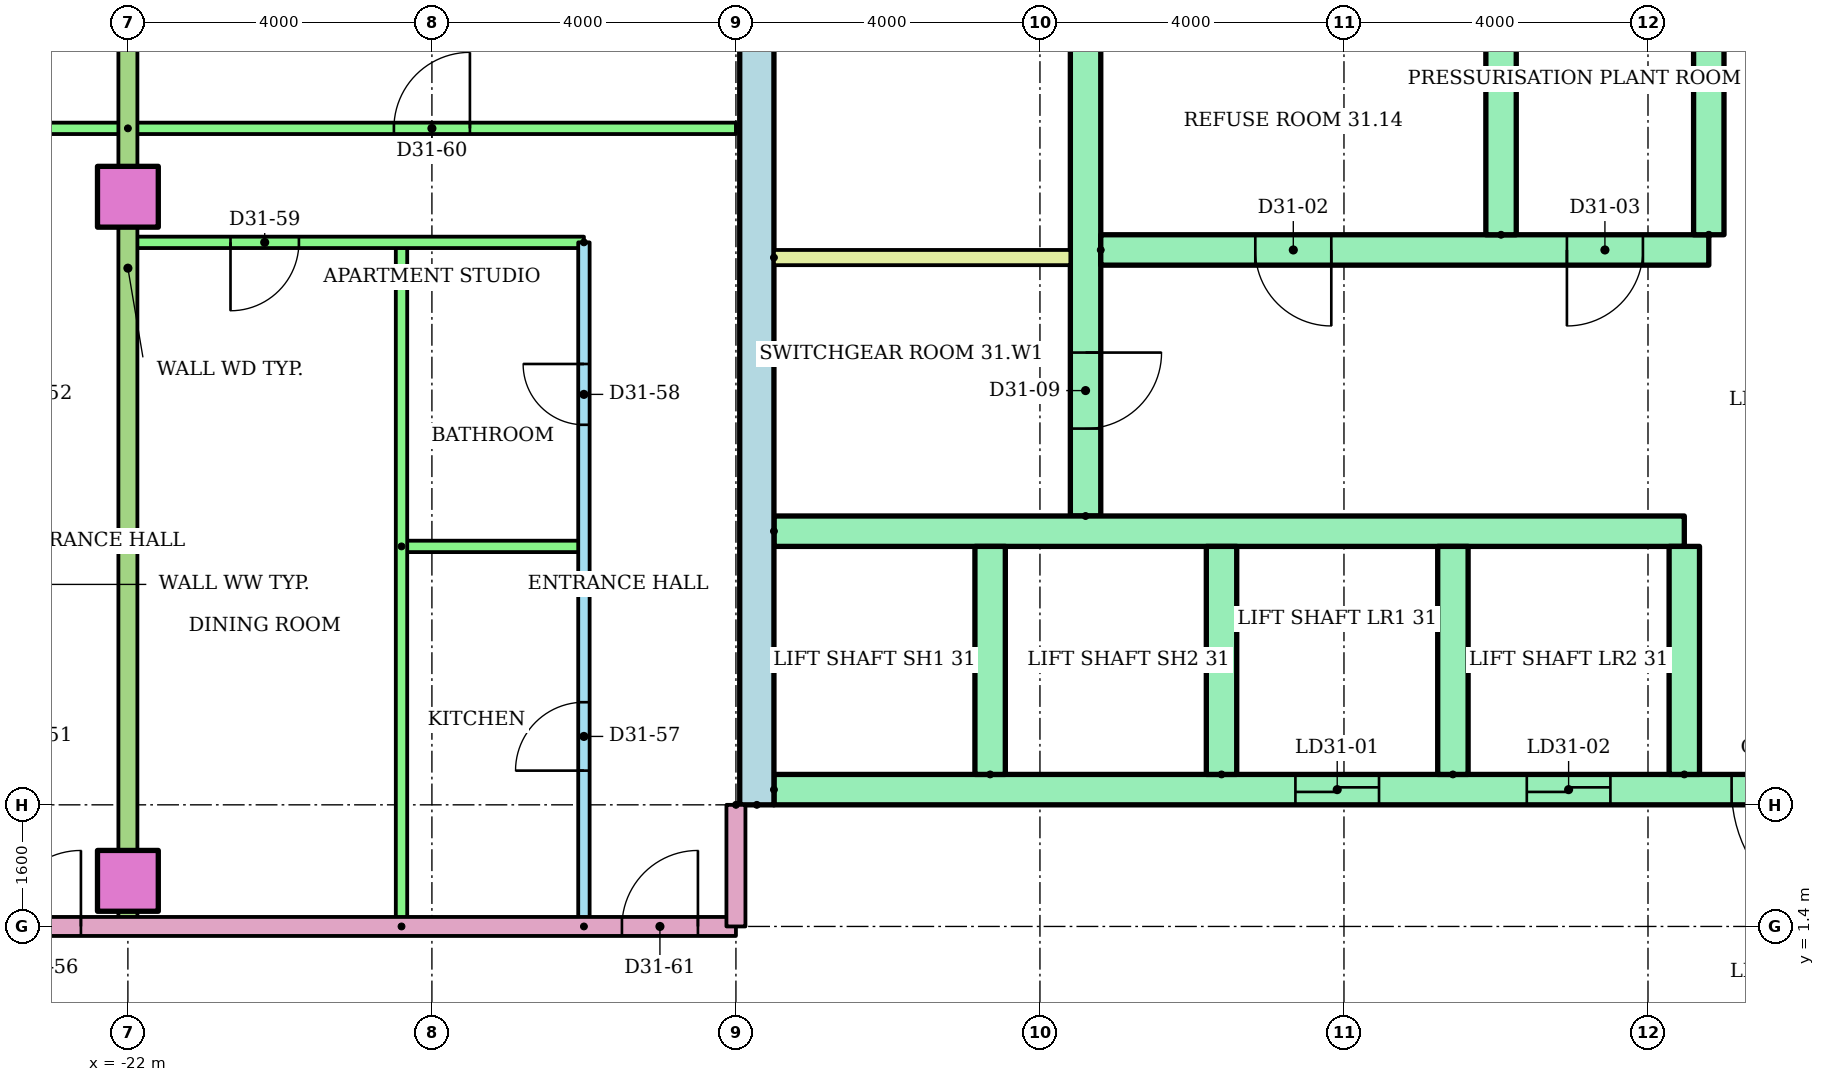
"""IFC4 building model, lengths in metres.
Left out: names, types, materials, properties, quantities, classifications, styles, units other than length and angle.
Written with IfcOpenShell. Run it as: python <this file> out.ifc"""

import sys

from ifc_helpers import new_model, si_unit, direction, frame, frame_2d, origin, origin_2d, place, context, subcontext, project, spatial, rectangle, extrude, element, fill, save


model = new_model("IFC4")
c1 = context("Model", 3, precision=1e-05, world=origin(), true_north=direction((0.0, 1.0)))
c2 = subcontext(c1, "Body", "Model", "MODEL_VIEW")
j1 = project(units=[si_unit("LENGTHUNIT", "METRE"), si_unit("PLANEANGLEUNIT", "RADIAN")], contexts=[c1])
p1 = place(None, origin())
s1 = spatial("IfcSite", under=j1, at=p1, CompositionType="ELEMENT")
p2 = place(p1, origin())
s2 = spatial("IfcBuilding", under=s1, at=p2, CompositionType="ELEMENT")
p3 = place(p2, frame((0.0, 0.0, 123.0)))
s3 = spatial("IfcBuildingStorey", under=s2, at=p3, CompositionType="ELEMENT", Elevation=123.0)
for number, where in (
    (1, (-22.0, 2.0, 0.0)),
    (2, (-22.0, 11.0, 0.0)),
):
    element("IfcColumn", number, at=place(p3, frame(where)), inside=s3, PredefinedType="COLUMN", context=c2, shape_type="SweptSolid", body=[
        extrude(rectangle(XDim=0.8, YDim=0.8, at=origin_2d()), origin(), (0.0, 0.0, 1.0), 3.2),
    ])
p4 = place(p3, frame((-13.725, 3.0, 0.0), z_axis=(0.0, 0.0, 1.0), x_axis=(0.0, 1.0, 0.0)))
e3 = element("IfcWall", 3, at=p4, inside=s3, PredefinedType="SHEAR", context=c2, shape_type="SweptSolid", body=[
    extrude(rectangle(XDim=17.0, YDim=0.45, at=frame_2d((8.5, 0.0))), origin(), (0.0, 0.0, 1.0), 2.92),
])
p5 = place(p3, frame((-9.4, 6.8, 0.0), z_axis=(0.0, 0.0, 1.0), x_axis=(0.0, 1.0, 0.0)))
e4 = element("IfcWall", 4, at=p5, inside=s3, PredefinedType="SHEAR", context=c2, shape_type="SweptSolid", body=[
    extrude(rectangle(XDim=12.7, YDim=0.4, at=frame_2d((6.35, 0.0))), origin(), (0.0, 0.0, 1.0), 2.92),
])
p6 = place(p5, frame((1.15, 0.0, 0.0)))
e5 = element("IfcOpeningElement", 5, at=p6, cuts=e4, PredefinedType="OPENING", context=c2, shape_type="SweptSolid", body=[
    extrude(rectangle(XDim=1.0, YDim=2.1, at=frame_2d((0.5, 1.05))), frame((0.0, 0.21, 0.0), z_axis=(0.0, -1.0, 0.0), x_axis=(1.0, 0.0, 0.0)), (0.0, 0.0, 1.0), 0.42),
])
p7 = place(p5, frame((7.925, 0.0, 0.0)))
e6 = element("IfcOpeningElement", 6, at=p7, cuts=e4, PredefinedType="OPENING", context=c2, shape_type="SweptSolid", body=[
    extrude(rectangle(XDim=1.0, YDim=2.1, at=frame_2d((0.5, 1.05))), frame((0.0, 0.21, 0.0), z_axis=(0.0, -1.0, 0.0), x_axis=(1.0, 0.0, 0.0)), (0.0, 0.0, 1.0), 0.42),
])
p8 = place(p3, frame((-13.5, 3.2, 0.0)))
e7 = element("IfcWall", 7, at=p8, inside=s3, PredefinedType="SHEAR", context=c2, shape_type="SweptSolid", body=[
    extrude(rectangle(XDim=27.0, YDim=0.4, at=frame_2d((13.5, 0.0))), origin(), (0.0, 0.0, 1.0), 2.92),
])
p9 = place(p8, frame((6.861, 0.0, 0.0)))
e8 = element("IfcOpeningElement", 8, at=p9, cuts=e7, PredefinedType="OPENING", context=c2, shape_type="SweptSolid", body=[
    extrude(rectangle(XDim=1.1, YDim=2.1, at=frame_2d((0.55, 1.05))), frame((0.0, 0.21, 0.0), z_axis=(0.0, -1.0, 0.0), x_axis=(1.0, 0.0, 0.0)), (0.0, 0.0, 1.0), 0.42),
])
p10 = place(p8, frame((9.906, 0.0, 0.0)))
e9 = element("IfcOpeningElement", 9, at=p10, cuts=e7, PredefinedType="OPENING", context=c2, shape_type="SweptSolid", body=[
    extrude(rectangle(XDim=1.1, YDim=2.1, at=frame_2d((0.55, 1.05))), frame((0.0, 0.21, 0.0), z_axis=(0.0, -1.0, 0.0), x_axis=(1.0, 0.0, 0.0)), (0.0, 0.0, 1.0), 0.42),
])
p11 = place(p8, frame((15.994, 0.0, 0.0)))
e10 = element("IfcOpeningElement", 10, at=p11, cuts=e7, PredefinedType="OPENING", context=c2, shape_type="SweptSolid", body=[
    extrude(rectangle(XDim=1.1, YDim=2.1, at=frame_2d((0.55, 1.05))), frame((0.0, 0.21, 0.0), z_axis=(0.0, -1.0, 0.0), x_axis=(1.0, 0.0, 0.0)), (0.0, 0.0, 1.0), 0.42),
])
p12 = place(p8, frame((19.039, 0.0, 0.0)))
e11 = element("IfcOpeningElement", 11, at=p12, cuts=e7, PredefinedType="OPENING", context=c2, shape_type="SweptSolid", body=[
    extrude(rectangle(XDim=1.1, YDim=2.1, at=frame_2d((0.55, 1.05))), frame((0.0, 0.21, 0.0), z_axis=(0.0, -1.0, 0.0), x_axis=(1.0, 0.0, 0.0)), (0.0, 0.0, 1.0), 0.42),
])
p13 = place(p8, frame((12.6, 0.0, 0.0)))
e12 = element("IfcOpeningElement", 12, at=p13, cuts=e7, PredefinedType="OPENING", context=c2, shape_type="SweptSolid", body=[
    extrude(rectangle(XDim=1.8, YDim=2.1, at=frame_2d((0.9, 1.05))), frame((0.0, 0.21, 0.0), z_axis=(0.0, -1.0, 0.0), x_axis=(1.0, 0.0, 0.0)), (0.0, 0.0, 1.0), 0.42),
])
p14 = place(p3, frame((-13.5, 6.6, 0.0)))
e13 = element("IfcWall", 13, at=p14, inside=s3, PredefinedType="SHEAR", context=c2, shape_type="SweptSolid", body=[
    extrude(rectangle(XDim=11.978, YDim=0.4, at=frame_2d((5.989, 0.0))), origin(), (0.0, 0.0, 1.0), 2.92),
])
for number, where, z_axis, x_axis in (
    (14, (-10.656, 3.4, 0.0), (0.0, 0.0, 1.0), (0.0, 1.0, 0.0)),
    (15, (-7.611, 3.4, 0.0), (0.0, 0.0, 1.0), (0.0, 1.0, 0.0)),
    (16, (-4.567, 3.4, 0.0), (0.0, 0.0, 1.0), (0.0, 1.0, 0.0)),
    (17, (-1.522, 3.4, 0.0), (0.0, 0.0, 1.0), (0.0, 1.0, 0.0)),
):
    element("IfcWall", number, at=place(p3, frame(where, z_axis=z_axis, x_axis=x_axis)), inside=s3, PredefinedType="SHEAR", context=c2, shape_type="SweptSolid", body=[
        extrude(rectangle(XDim=3.0, YDim=0.4, at=frame_2d((1.5, 0.0))), origin(), (0.0, 0.0, 1.0), 2.92),
    ])
p15 = place(p3, frame((-9.2, 10.3, 0.0)))
e18 = element("IfcWall", 18, at=p15, inside=s3, PredefinedType="SHEAR", context=c2, shape_type="SweptSolid", body=[
    extrude(rectangle(XDim=8.0, YDim=0.4, at=frame_2d((4.0, 0.0))), origin(), (0.0, 0.0, 1.0), 2.92),
])
p16 = place(p15, frame((2.033, 0.0, 0.0)))
e19 = element("IfcOpeningElement", 19, at=p16, cuts=e18, PredefinedType="OPENING", context=c2, shape_type="SweptSolid", body=[
    extrude(rectangle(XDim=1.0, YDim=2.1, at=frame_2d((0.5, 1.05))), frame((0.0, 0.21, 0.0), z_axis=(0.0, -1.0, 0.0), x_axis=(1.0, 0.0, 0.0)), (0.0, 0.0, 1.0), 0.42),
])
p17 = place(p15, frame((6.133, 0.0, 0.0)))
e20 = element("IfcOpeningElement", 20, at=p17, cuts=e18, PredefinedType="OPENING", context=c2, shape_type="SweptSolid", body=[
    extrude(rectangle(XDim=1.0, YDim=2.1, at=frame_2d((0.5, 1.05))), frame((0.0, 0.21, 0.0), z_axis=(0.0, -1.0, 0.0), x_axis=(1.0, 0.0, 0.0)), (0.0, 0.0, 1.0), 0.42),
])
for number, where, z_axis, x_axis in (
    (21, (-3.933, 10.5, 0.0), (0.0, 0.0, 1.0), (0.0, 1.0, 0.0)),
    (22, (-1.2, 10.5, 0.0), (0.0, 0.0, 1.0), (0.0, 1.0, 0.0)),
):
    element("IfcWall", number, at=place(p3, frame(where, z_axis=z_axis, x_axis=x_axis)), inside=s3, PredefinedType="SHEAR", context=c2, shape_type="SweptSolid", body=[
        extrude(rectangle(XDim=3.0, YDim=0.4, at=frame_2d((1.5, 0.0))), origin(), (0.0, 0.0, 1.0), 2.92),
    ])
p18 = place(p3, frame((-13.5, 10.2, 0.0)))
e23 = element("IfcWall", 23, at=p18, inside=s3, PredefinedType="PARTITIONING", context=c2, shape_type="SweptSolid", body=[
    extrude(rectangle(XDim=3.9, YDim=0.2, at=frame_2d((1.95, 0.0))), origin(), (0.0, 0.0, 1.0), 2.92),
])
p19 = place(p3, frame((-32.72, 11.9, 0.0)))
e24 = element("IfcWall", 24, at=p19, inside=s3, PredefinedType="PARTITIONING", context=c2, shape_type="SweptSolid", body=[
    extrude(rectangle(XDim=10.72, YDim=0.15, at=frame_2d((5.36, 0.0))), origin(), (0.0, 0.0, 1.0), 2.4),
])
p20 = place(p19, frame((1.102, 0.0, 0.0)))
e25 = element("IfcOpeningElement", 25, at=p20, cuts=e24, PredefinedType="OPENING", context=c2, shape_type="SweptSolid", body=[
    extrude(rectangle(XDim=1.0, YDim=2.1, at=frame_2d((0.5, 1.05))), frame((0.0, 0.085, 0.0), z_axis=(0.0, -1.0, 0.0), x_axis=(1.0, 0.0, 0.0)), (0.0, 0.0, 1.0), 0.17),
])
p21 = place(p19, frame((7.22, 0.0, 0.0)))
e26 = element("IfcOpeningElement", 26, at=p21, cuts=e24, PredefinedType="OPENING", context=c2, shape_type="SweptSolid", body=[
    extrude(rectangle(XDim=1.0, YDim=2.1, at=frame_2d((0.5, 1.05))), frame((0.0, 0.085, 0.0), z_axis=(0.0, -1.0, 0.0), x_axis=(1.0, 0.0, 0.0)), (0.0, 0.0, 1.0), 0.17),
])
p22 = place(p3, frame((-16.0, 1.4, 0.0), z_axis=(0.0, 0.0, 1.0), x_axis=(0.0, 1.0, 0.0)))
e27 = element("IfcWall", 27, at=p22, inside=s3, PredefinedType="PARTITIONING", context=c2, shape_type="SweptSolid", body=[
    extrude(rectangle(XDim=9.0, YDim=0.15, at=frame_2d((4.5, 0.0))), origin(), (0.0, 0.0, 1.0), 2.4),
])
p23 = place(p22, frame((2.05, 0.0, 0.0)))
e28 = element("IfcOpeningElement", 28, at=p23, cuts=e27, PredefinedType="OPENING", context=c2, shape_type="SweptSolid", body=[
    extrude(rectangle(XDim=0.9, YDim=2.1, at=frame_2d((0.45, 1.05))), frame((0.0, 0.085, 0.0), z_axis=(0.0, -1.0, 0.0), x_axis=(1.0, 0.0, 0.0)), (0.0, 0.0, 1.0), 0.17),
])
p24 = place(p22, frame((6.6, 0.0, 0.0)))
e29 = element("IfcOpeningElement", 29, at=p24, cuts=e27, PredefinedType="OPENING", context=c2, shape_type="SweptSolid", body=[
    extrude(rectangle(XDim=0.8, YDim=2.1, at=frame_2d((0.4, 1.05))), frame((0.0, 0.085, 0.0), z_axis=(0.0, -1.0, 0.0), x_axis=(1.0, 0.0, 0.0)), (0.0, 0.0, 1.0), 0.17),
])
p25 = place(p3, frame((-18.4, 6.4, 0.0)))
e30 = element("IfcWall", 30, at=p25, inside=s3, PredefinedType="PARTITIONING", context=c2, shape_type="SweptSolid", body=[
    extrude(rectangle(XDim=2.4, YDim=0.15, at=frame_2d((1.2, 0.0))), origin(), (0.0, 0.0, 1.0), 2.4),
])
p26 = place(p3, frame((-18.4, 1.4, 0.0), z_axis=(0.0, 0.0, 1.0), x_axis=(0.0, 1.0, 0.0)))
e31 = element("IfcWall", 31, at=p26, inside=s3, PredefinedType="PARTITIONING", context=c2, shape_type="SweptSolid", body=[
    extrude(rectangle(XDim=9.0, YDim=0.15, at=frame_2d((4.5, 0.0))), origin(), (0.0, 0.0, 1.0), 2.4),
])
p27 = place(p3, frame((-16.0, 10.4, 0.0), z_axis=(0.0, 0.0, 1.0), x_axis=(-1.0, 0.0, 0.0)))
e32 = element("IfcWall", 32, at=p27, inside=s3, PredefinedType="PARTITIONING", context=c2, shape_type="SweptSolid", body=[
    extrude(rectangle(XDim=6.0, YDim=0.15, at=frame_2d((3.0, 0.0))), origin(), (0.0, 0.0, 1.0), 2.4),
])
p28 = place(p27, frame((3.75, 0.0, 0.0)))
e33 = element("IfcOpeningElement", 33, at=p28, cuts=e32, PredefinedType="OPENING", context=c2, shape_type="SweptSolid", body=[
    extrude(rectangle(XDim=0.9, YDim=2.1, at=frame_2d((0.45, 1.05))), frame((0.0, 0.085, 0.0), z_axis=(0.0, -1.0, 0.0), x_axis=(1.0, 0.0, 0.0)), (0.0, 0.0, 1.0), 0.17),
])
p29 = place(p3, frame((-22.0, 11.9, 0.0)))
e34 = element("IfcWall", 34, at=p29, inside=s3, PredefinedType="PARTITIONING", context=c2, shape_type="SweptSolid", body=[
    extrude(rectangle(XDim=8.0, YDim=0.15, at=frame_2d((4.0, 0.0))), origin(), (0.0, 0.0, 1.0), 2.4),
])
p30 = place(p29, frame((3.5, 0.0, 0.0)))
e35 = element("IfcOpeningElement", 35, at=p30, cuts=e34, PredefinedType="OPENING", context=c2, shape_type="SweptSolid", body=[
    extrude(rectangle(XDim=1.0, YDim=2.1, at=frame_2d((0.5, 1.05))), frame((0.0, 0.085, 0.0), z_axis=(0.0, -1.0, 0.0), x_axis=(1.0, 0.0, 0.0)), (0.0, 0.0, 1.0), 0.17),
])
p31 = place(p3, frame((-22.0, 18.721, 0.0), z_axis=(0.0, 0.0, 1.0), x_axis=(0.0, -1.0, 0.0)))
e36 = element("IfcWall", 36, at=p31, inside=s3, PredefinedType="PARTITIONING", context=c2, shape_type="SweptSolid", body=[
    extrude(rectangle(XDim=17.321, YDim=0.25, at=frame_2d((8.661, 0.0))), origin(), (0.0, 0.0, 1.0), 2.4),
])
p32 = place(p3, frame((-29.0, 1.4, 0.0)))
e37 = element("IfcWall", 37, at=p32, inside=s3, PredefinedType="PARTITIONING", context=c2, shape_type="SweptSolid", body=[
    extrude(rectangle(XDim=15.0, YDim=0.25, at=frame_2d((7.5, 0.0))), origin(), (0.0, 0.0, 1.0), 2.4),
])
p33 = place(p32, frame((5.382, 0.0, 0.0)))
e38 = element("IfcOpeningElement", 38, at=p33, cuts=e37, PredefinedType="OPENING", context=c2, shape_type="SweptSolid", body=[
    extrude(rectangle(XDim=1.0, YDim=2.1, at=frame_2d((0.5, 1.05))), frame((0.0, 0.135, 0.0), z_axis=(0.0, -1.0, 0.0), x_axis=(1.0, 0.0, 0.0)), (0.0, 0.0, 1.0), 0.27),
])
p34 = place(p32, frame((13.5, 0.0, 0.0)))
e39 = element("IfcOpeningElement", 39, at=p34, cuts=e37, PredefinedType="OPENING", context=c2, shape_type="SweptSolid", body=[
    extrude(rectangle(XDim=1.0, YDim=2.1, at=frame_2d((0.5, 1.05))), frame((0.0, 0.135, 0.0), z_axis=(0.0, -1.0, 0.0), x_axis=(1.0, 0.0, 0.0)), (0.0, 0.0, 1.0), 0.27),
])
p35 = place(p3, frame((-14.0, 3.0, 0.0), z_axis=(0.0, 0.0, 1.0), x_axis=(0.0, -1.0, 0.0)))
e40 = element("IfcWall", 40, at=p35, inside=s3, PredefinedType="PARTITIONING", context=c2, shape_type="SweptSolid", body=[
    extrude(rectangle(XDim=1.6, YDim=0.25, at=frame_2d((0.8, 0.0))), origin(), (0.0, 0.0, 1.0), 2.4),
])
p36 = place(p9, origin())
e41 = element("IfcDoor", 41, at=p36, inside=s3, OperationType="SLIDING_TO_LEFT", PredefinedType="DOOR", context=c2, shape_type="SweptSolid", body=[
    extrude(rectangle(XDim=1.1, YDim=2.1, at=frame_2d((0.55, 1.05))), frame((0.0, 0.025, 0.0), z_axis=(0.0, -1.0, 0.0), x_axis=(1.0, 0.0, 0.0)), (0.0, 0.0, 1.0), 0.05),
])
fill(e8, e41)
p37 = place(p10, origin())
e42 = element("IfcDoor", 42, at=p37, inside=s3, OperationType="SLIDING_TO_LEFT", PredefinedType="DOOR", context=c2, shape_type="SweptSolid", body=[
    extrude(rectangle(XDim=1.1, YDim=2.1, at=frame_2d((0.55, 1.05))), frame((0.0, 0.025, 0.0), z_axis=(0.0, -1.0, 0.0), x_axis=(1.0, 0.0, 0.0)), (0.0, 0.0, 1.0), 0.05),
])
fill(e9, e42)
p38 = place(p13, frame((1.8, 0.0, 0.0), z_axis=(0.0, 0.0, 1.0), x_axis=(-1.0, 0.0, 0.0)))
e43 = element("IfcDoor", 43, at=p38, inside=s3, OperationType="DOUBLE_DOOR_SINGLE_SWING", PredefinedType="DOOR", context=c2, shape_type="SweptSolid", body=[
    extrude(rectangle(XDim=1.8, YDim=2.1, at=frame_2d((0.9, 1.05))), frame((0.0, 0.025, 0.0), z_axis=(0.0, -1.0, 0.0), x_axis=(1.0, 0.0, 0.0)), (0.0, 0.0, 1.0), 0.05),
])
fill(e12, e43)
p39 = place(p16, frame((1.0, 0.0, 0.0), z_axis=(0.0, 0.0, 1.0), x_axis=(-1.0, 0.0, 0.0)))
e44 = element("IfcDoor", 44, at=p39, inside=s3, OperationType="SINGLE_SWING_RIGHT", PredefinedType="DOOR", context=c2, shape_type="SweptSolid", body=[
    extrude(rectangle(XDim=1.0, YDim=2.1, at=frame_2d((0.5, 1.05))), frame((0.0, 0.025, 0.0), z_axis=(0.0, -1.0, 0.0), x_axis=(1.0, 0.0, 0.0)), (0.0, 0.0, 1.0), 0.05),
])
fill(e19, e44)
p40 = place(p17, frame((1.0, 0.0, 0.0), z_axis=(0.0, 0.0, 1.0), x_axis=(-1.0, 0.0, 0.0)))
e45 = element("IfcDoor", 45, at=p40, inside=s3, OperationType="SINGLE_SWING_LEFT", PredefinedType="DOOR", context=c2, shape_type="SweptSolid", body=[
    extrude(rectangle(XDim=1.0, YDim=2.1, at=frame_2d((0.5, 1.05))), frame((0.0, 0.025, 0.0), z_axis=(0.0, -1.0, 0.0), x_axis=(1.0, 0.0, 0.0)), (0.0, 0.0, 1.0), 0.05),
])
fill(e20, e45)
p41 = place(p6, frame((1.0, 0.0, 0.0), z_axis=(0.0, 0.0, 1.0), x_axis=(-1.0, 0.0, 0.0)))
e46 = element("IfcDoor", 46, at=p41, inside=s3, OperationType="SINGLE_SWING_RIGHT", PredefinedType="DOOR", context=c2, shape_type="SweptSolid", body=[
    extrude(rectangle(XDim=1.0, YDim=2.1, at=frame_2d((0.5, 1.05))), frame((0.0, 0.025, 0.0), z_axis=(0.0, -1.0, 0.0), x_axis=(1.0, 0.0, 0.0)), (0.0, 0.0, 1.0), 0.05),
])
fill(e5, e46)
p42 = place(p33, origin())
e47 = element("IfcDoor", 47, at=p42, inside=s3, OperationType="SINGLE_SWING_RIGHT", PredefinedType="DOOR", context=c2, shape_type="SweptSolid", body=[
    extrude(rectangle(XDim=1.0, YDim=2.1, at=frame_2d((0.5, 1.05))), frame((0.0, 0.025, 0.0), z_axis=(0.0, -1.0, 0.0), x_axis=(1.0, 0.0, 0.0)), (0.0, 0.0, 1.0), 0.05),
])
fill(e38, e47)
p43 = place(p23, origin())
e48 = element("IfcDoor", 48, at=p43, inside=s3, OperationType="SINGLE_SWING_LEFT", PredefinedType="DOOR", context=c2, shape_type="SweptSolid", body=[
    extrude(rectangle(XDim=0.9, YDim=2.1, at=frame_2d((0.45, 1.05))), frame((0.0, 0.025, 0.0), z_axis=(0.0, -1.0, 0.0), x_axis=(1.0, 0.0, 0.0)), (0.0, 0.0, 1.0), 0.05),
])
fill(e28, e48)
p44 = place(p24, origin())
e49 = element("IfcDoor", 49, at=p44, inside=s3, OperationType="SINGLE_SWING_RIGHT", PredefinedType="DOOR", context=c2, shape_type="SweptSolid", body=[
    extrude(rectangle(XDim=0.8, YDim=2.1, at=frame_2d((0.4, 1.05))), frame((0.0, 0.025, 0.0), z_axis=(0.0, -1.0, 0.0), x_axis=(1.0, 0.0, 0.0)), (0.0, 0.0, 1.0), 0.05),
])
fill(e29, e49)
p45 = place(p28, origin())
e50 = element("IfcDoor", 50, at=p45, inside=s3, OperationType="SINGLE_SWING_RIGHT", PredefinedType="DOOR", context=c2, shape_type="SweptSolid", body=[
    extrude(rectangle(XDim=0.9, YDim=2.1, at=frame_2d((0.45, 1.05))), frame((0.0, 0.025, 0.0), z_axis=(0.0, -1.0, 0.0), x_axis=(1.0, 0.0, 0.0)), (0.0, 0.0, 1.0), 0.05),
])
fill(e33, e50)
p46 = place(p30, origin())
e51 = element("IfcDoor", 51, at=p46, inside=s3, OperationType="SINGLE_SWING_RIGHT", PredefinedType="DOOR", context=c2, shape_type="SweptSolid", body=[
    extrude(rectangle(XDim=1.0, YDim=2.1, at=frame_2d((0.5, 1.05))), frame((0.0, 0.025, 0.0), z_axis=(0.0, -1.0, 0.0), x_axis=(1.0, 0.0, 0.0)), (0.0, 0.0, 1.0), 0.05),
])
fill(e35, e51)
p47 = place(p34, origin())
e52 = element("IfcDoor", 52, at=p47, inside=s3, OperationType="SINGLE_SWING_RIGHT", PredefinedType="DOOR", context=c2, shape_type="SweptSolid", body=[
    extrude(rectangle(XDim=1.0, YDim=2.1, at=frame_2d((0.5, 1.05))), frame((0.0, 0.025, 0.0), z_axis=(0.0, -1.0, 0.0), x_axis=(1.0, 0.0, 0.0)), (0.0, 0.0, 1.0), 0.05),
])
fill(e39, e52)
save(model, sys.argv[1])
